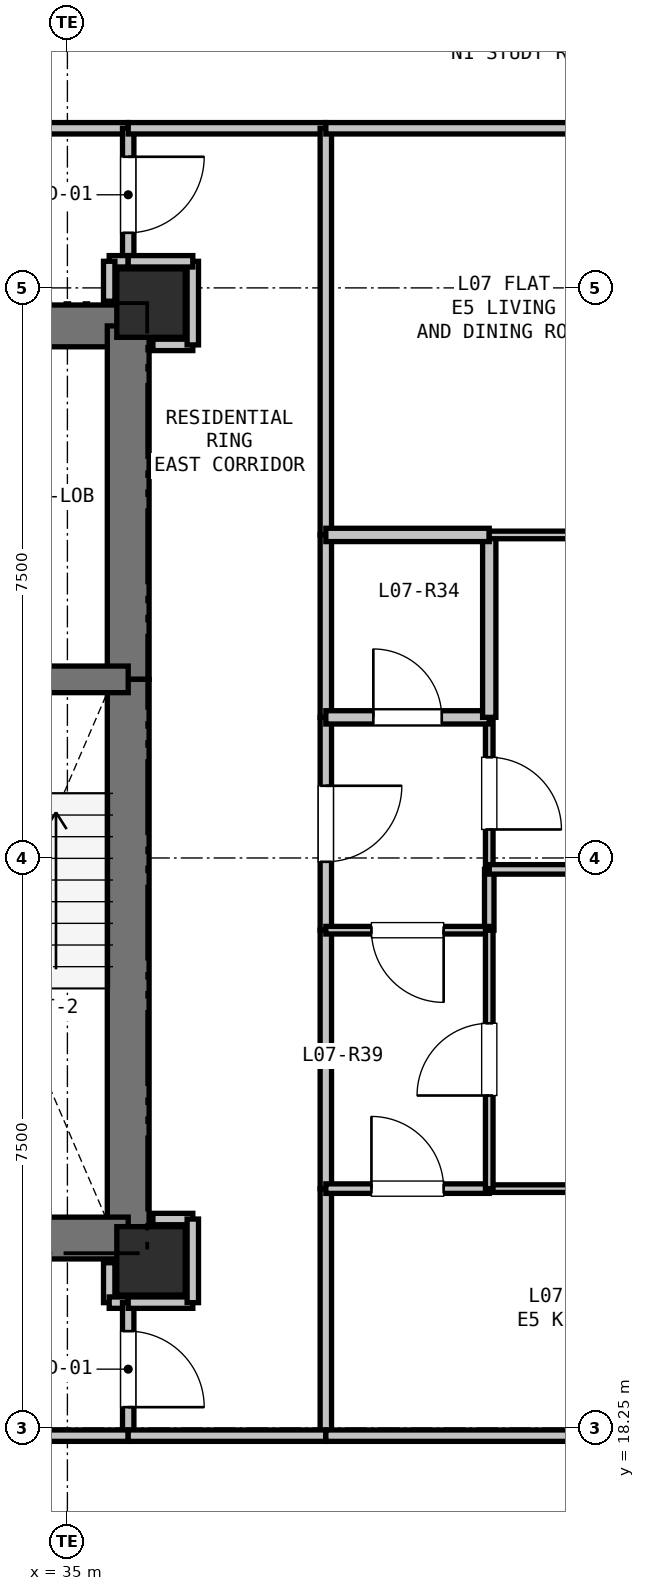
"""IFC4 building model, lengths in metres.
Left out: names, types, materials, properties, quantities, classifications, styles, units other than length and angle.
Written with IfcOpenShell. Run it as: python <this file> out.ifc"""

import sys

from ifc_helpers import new_model, si_unit, direction, frame, frame_2d, origin, origin_2d, place, context, subcontext, project, spatial, rectangle, extrude, element, fill, save


model = new_model("IFC4")
c1 = context("Model", 3, precision=1e-05, world=origin(), true_north=direction((0.0, 1.0)))
c2 = subcontext(c1, "Body", "Model", "MODEL_VIEW")
j1 = project(units=[si_unit("LENGTHUNIT", "METRE"), si_unit("PLANEANGLEUNIT", "RADIAN")], contexts=[c1])
p1 = place(None, origin())
s1 = spatial("IfcSite", under=j1, at=p1, CompositionType="ELEMENT")
p2 = place(p1, origin())
s2 = spatial("IfcBuilding", under=s1, at=p2, CompositionType="ELEMENT")
p3 = place(p2, frame((0.0, 0.0, 29.1)))
s3 = spatial("IfcBuildingStorey", under=s2, at=p3, CompositionType="ELEMENT", Elevation=29.1)
for number, where, z_axis, x_axis in (
    (1, (36.1, 33.05, 0.0), (0.0, 0.0, 1.0), (1.0, 0.0, 0.0)),
    (2, (36.1, 20.45, 0.0), (0.0, 0.0, 1.0), (1.0, 0.0, 0.0)),
):
    element("IfcColumn", number, at=place(p3, frame(where, z_axis=z_axis, x_axis=x_axis)), inside=s3, PredefinedType="COLUMN", context=c2, shape_type="SweptSolid", body=[
        extrude(rectangle(XDim=0.9, YDim=0.9, at=origin_2d()), origin(), (0.0, 0.0, 1.0), 3.3),
    ])
p4 = place(p3, frame((32.35, 32.75, 0.0), z_axis=(0.0, 0.0, 1.0), x_axis=(1.0, 0.0, 0.0)))
e3 = element("IfcWall", 3, at=p4, inside=s3, PredefinedType="SHEAR", context=c2, shape_type="SweptSolid", body=[
    extrude(rectangle(XDim=3.45, YDim=0.55, at=frame_2d((1.725, 0.0))), origin(), (0.0, 0.0, 1.0), 3.04),
])
p5 = place(p4, frame((0.65, 0.0, 0.0)))
e4 = element("IfcOpeningElement", 4, at=p5, cuts=e3, PredefinedType="OPENING", context=c2, shape_type="SweptSolid", body=[
    extrude(rectangle(XDim=1.15, YDim=2.15, at=frame_2d((0.575, 1.075))), frame((0.0, 0.285, 0.0), z_axis=(0.0, -1.0, 0.0), x_axis=(1.0, 0.0, 0.0)), (0.0, 0.0, 1.0), 0.57),
])
p6 = place(p3, frame((35.8, 32.75, 0.0), z_axis=(0.0, 0.0, 1.0), x_axis=(0.0, -1.0, 0.0)))
e5 = element("IfcWall", 5, at=p6, inside=s3, PredefinedType="SHEAR", context=c2, shape_type="SweptSolid", body=[
    extrude(rectangle(XDim=4.65, YDim=0.55, at=frame_2d((2.325, 0.0))), origin(), (0.0, 0.0, 1.0), 3.04),
])
p7 = place(p3, frame((35.8, 28.1, 0.0), z_axis=(0.0, 0.0, 1.0), x_axis=(0.0, -1.0, 0.0)))
e6 = element("IfcWall", 6, at=p7, inside=s3, PredefinedType="SHEAR", context=c2, shape_type="SweptSolid", body=[
    extrude(rectangle(XDim=7.35, YDim=0.55, at=frame_2d((3.675, 0.0))), origin(), (0.0, 0.0, 1.0), 3.04),
])
p8 = place(p3, frame((35.8, 20.75, 0.0), z_axis=(0.0, 0.0, 1.0), x_axis=(-1.0, 0.0, 0.0)))
e7 = element("IfcWall", 7, at=p8, inside=s3, PredefinedType="SHEAR", context=c2, shape_type="SweptSolid", body=[
    extrude(rectangle(XDim=3.45, YDim=0.55, at=frame_2d((1.725, 0.0))), origin(), (0.0, 0.0, 1.0), 3.04),
])
p9 = place(p3, frame((32.35, 28.1, 0.0), z_axis=(0.0, 0.0, 1.0), x_axis=(1.0, 0.0, 0.0)))
e8 = element("IfcWall", 8, at=p9, inside=s3, PredefinedType="SHEAR", context=c2, shape_type="SweptSolid", body=[
    extrude(rectangle(XDim=3.45, YDim=0.35, at=frame_2d((1.725, 0.0))), origin(), (0.0, 0.0, 1.0), 3.04),
])
p10 = place(p9, frame((1.15, 0.0, 0.0)))
e9 = element("IfcOpeningElement", 9, at=p10, cuts=e8, PredefinedType="OPENING", context=c2, shape_type="SweptSolid", body=[
    extrude(rectangle(XDim=1.15, YDim=2.15, at=frame_2d((0.575, 1.075))), frame((0.0, 0.185, 0.0), z_axis=(0.0, -1.0, 0.0), x_axis=(1.0, 0.0, 0.0)), (0.0, 0.0, 1.0), 0.37),
])
p11 = place(p3, frame((35.55, 20.425, 0.0), z_axis=(0.0, 0.0, 1.0), x_axis=(0.0, -1.0, 0.0)))
e10 = element("IfcWall", 10, at=p11, inside=s3, PredefinedType="PARTITIONING", context=c2, shape_type="SweptSolid", body=[
    extrude(rectangle(XDim=0.525, YDim=0.15, at=frame_2d((0.263, 0.0))), origin(), (0.0, 0.0, 1.0), 2.488),
])
p12 = place(p3, frame((35.55, 19.9, 0.0), z_axis=(0.0, 0.0, 1.0), x_axis=(1.0, 0.0, 0.0)))
e11 = element("IfcWall", 11, at=p12, inside=s3, PredefinedType="PARTITIONING", context=c2, shape_type="SweptSolid", body=[
    extrude(rectangle(XDim=0.25, YDim=0.15, at=frame_2d((0.125, 0.0))), origin(), (0.0, 0.0, 1.0), 3.04),
])
p13 = place(p3, frame((35.8, 19.9, 0.0), z_axis=(0.0, 0.0, 1.0), x_axis=(0.0, -1.0, 0.0)))
e12 = element("IfcWall", 12, at=p13, inside=s3, PredefinedType="PARTITIONING", context=c2, shape_type="SweptSolid", body=[
    extrude(rectangle(XDim=1.75, YDim=0.15, at=frame_2d((0.875, 0.0))), origin(), (0.0, 0.0, 1.0), 3.04),
])
p14 = place(p13, frame((0.375, 0.0, 0.0)))
e13 = element("IfcOpeningElement", 13, at=p14, cuts=e12, PredefinedType="OPENING", context=c2, shape_type="SweptSolid", body=[
    extrude(rectangle(XDim=1.0, YDim=2.15, at=frame_2d((0.5, 1.075))), frame((0.0, 0.085, 0.0), z_axis=(0.0, -1.0, 0.0), x_axis=(1.0, 0.0, 0.0)), (0.0, 0.0, 1.0), 0.17),
])
p15 = place(p3, frame((35.8, 18.15, 0.0), z_axis=(0.0, 0.0, 1.0), x_axis=(-1.0, 0.0, 0.0)))
e14 = element("IfcWall", 14, at=p15, inside=s3, PredefinedType="PARTITIONING", context=c2, shape_type="SweptSolid", body=[
    extrude(rectangle(XDim=1.6, YDim=0.15, at=frame_2d((0.8, 0.0))), origin(), (0.0, 0.0, 1.0), 3.04),
])
p16 = place(p3, frame((34.0, 35.35, 0.0), z_axis=(0.0, 0.0, 1.0), x_axis=(1.0, 0.0, 0.0)))
e15 = element("IfcWall", 15, at=p16, inside=s3, PredefinedType="PARTITIONING", context=c2, shape_type="SweptSolid", body=[
    extrude(rectangle(XDim=1.8, YDim=0.15, at=frame_2d((0.9, 0.0))), origin(), (0.0, 0.0, 1.0), 3.04),
])
p17 = place(p3, frame((35.8, 35.35, 0.0), z_axis=(0.0, 0.0, 1.0), x_axis=(0.0, -1.0, 0.0)))
e16 = element("IfcWall", 16, at=p17, inside=s3, PredefinedType="PARTITIONING", context=c2, shape_type="SweptSolid", body=[
    extrude(rectangle(XDim=1.75, YDim=0.15, at=frame_2d((0.875, 0.0))), origin(), (0.0, 0.0, 1.0), 3.04),
])
p18 = place(p17, frame((0.375, 0.0, 0.0)))
e17 = element("IfcOpeningElement", 17, at=p18, cuts=e16, PredefinedType="OPENING", context=c2, shape_type="SweptSolid", body=[
    extrude(rectangle(XDim=1.0, YDim=2.15, at=frame_2d((0.5, 1.075))), frame((0.0, 0.085, 0.0), z_axis=(0.0, -1.0, 0.0), x_axis=(1.0, 0.0, 0.0)), (0.0, 0.0, 1.0), 0.17),
])
p19 = place(p3, frame((35.8, 33.6, 0.0), z_axis=(0.0, 0.0, 1.0), x_axis=(-1.0, 0.0, 0.0)))
e18 = element("IfcWall", 18, at=p19, inside=s3, PredefinedType="PARTITIONING", context=c2, shape_type="SweptSolid", body=[
    extrude(rectangle(XDim=0.25, YDim=0.15, at=frame_2d((0.125, 0.0))), origin(), (0.0, 0.0, 1.0), 3.04),
])
p20 = place(p3, frame((35.55, 33.6, 0.0), z_axis=(0.0, 0.0, 1.0), x_axis=(0.0, -1.0, 0.0)))
e19 = element("IfcWall", 19, at=p20, inside=s3, PredefinedType="PARTITIONING", context=c2, shape_type="SweptSolid", body=[
    extrude(rectangle(XDim=0.525, YDim=0.15, at=frame_2d((0.263, 0.0))), origin(), (0.0, 0.0, 1.0), 2.488),
])
for number, where, z_axis, x_axis in (
    (20, (36.65, 21.0, 0.0), (0.0, 0.0, 1.0), (-1.0, 0.0, 0.0)),
    (21, (36.125, 32.5, 0.0), (0.0, 0.0, 1.0), (1.0, 0.0, 0.0)),
):
    element("IfcWall", number, at=place(p3, frame(where, z_axis=z_axis, x_axis=x_axis)), inside=s3, PredefinedType="PARTITIONING", context=c2, shape_type="SweptSolid", body=[
        extrude(rectangle(XDim=0.525, YDim=0.15, at=frame_2d((0.262, 0.0))), origin(), (0.0, 0.0, 1.0), 2.488),
    ])
p21 = place(p3, frame((36.65, 32.5, 0.0), z_axis=(0.0, 0.0, 1.0), x_axis=(0.0, 1.0, 0.0)))
e22 = element("IfcWall", 22, at=p21, inside=s3, PredefinedType="PARTITIONING", context=c2, shape_type="SweptSolid", body=[
    extrude(rectangle(XDim=1.1, YDim=0.15, at=frame_2d((0.55, 0.0))), origin(), (0.0, 0.0, 1.0), 2.337),
])
p22 = place(p3, frame((36.65, 33.6, 0.0), z_axis=(0.0, 0.0, 1.0), x_axis=(-1.0, 0.0, 0.0)))
e23 = element("IfcWall", 23, at=p22, inside=s3, PredefinedType="PARTITIONING", context=c2, shape_type="SweptSolid", body=[
    extrude(rectangle(XDim=0.85, YDim=0.15, at=frame_2d((0.425, 0.0))), origin(), (0.0, 0.0, 1.0), 2.337),
])
p23 = place(p3, frame((35.8, 35.35, 0.0), z_axis=(0.0, 0.0, 1.0), x_axis=(1.0, 0.0, 0.0)))
e24 = element("IfcWall", 24, at=p23, inside=s3, PredefinedType="PARTITIONING", context=c2, shape_type="SweptSolid", body=[
    extrude(rectangle(XDim=2.6, YDim=0.15, at=frame_2d((1.3, 0.0))), origin(), (0.0, 0.0, 1.0), 2.337),
])
p24 = place(p3, frame((38.4, 35.35, 0.0), z_axis=(0.0, 0.0, 1.0), x_axis=(0.0, -1.0, 0.0)))
e25 = element("IfcWall", 25, at=p24, inside=s3, PredefinedType="PARTITIONING", context=c2, shape_type="SweptSolid", body=[
    extrude(rectangle(XDim=5.35, YDim=0.15, at=frame_2d((2.675, 0.0))), origin(), (0.0, 0.0, 1.0), 2.337),
])
p25 = place(p3, frame((38.4, 30.0, 0.0), z_axis=(0.0, 0.0, 1.0), x_axis=(0.0, -1.0, 0.0)))
e26 = element("IfcWall", 26, at=p25, inside=s3, PredefinedType="PARTITIONING", context=c2, shape_type="SweptSolid", body=[
    extrude(rectangle(XDim=2.4, YDim=0.15, at=frame_2d((1.2, 0.0))), origin(), (0.0, 0.0, 1.0), 3.04),
])
p26 = place(p3, frame((38.4, 27.6, 0.0), z_axis=(0.0, 0.0, 1.0), x_axis=(0.0, -1.0, 0.0)))
e27 = element("IfcWall", 27, at=p26, inside=s3, PredefinedType="PARTITIONING", context=c2, shape_type="SweptSolid", body=[
    extrude(rectangle(XDim=2.8, YDim=0.15, at=frame_2d((1.4, 0.0))), origin(), (0.0, 0.0, 1.0), 3.04),
])
p27 = place(p26, frame((0.9, 0.0, 0.0)))
e28 = element("IfcOpeningElement", 28, at=p27, cuts=e27, PredefinedType="OPENING", context=c2, shape_type="SweptSolid", body=[
    extrude(rectangle(XDim=1.0, YDim=2.15, at=frame_2d((0.5, 1.075))), frame((0.0, 0.085, 0.0), z_axis=(0.0, -1.0, 0.0), x_axis=(1.0, 0.0, 0.0)), (0.0, 0.0, 1.0), 0.17),
])
p28 = place(p3, frame((38.4, 24.8, 0.0), z_axis=(0.0, 0.0, 1.0), x_axis=(0.0, -1.0, 0.0)))
e29 = element("IfcWall", 29, at=p28, inside=s3, PredefinedType="PARTITIONING", context=c2, shape_type="SweptSolid", body=[
    extrude(rectangle(XDim=3.4, YDim=0.15, at=frame_2d((1.7, 0.0))), origin(), (0.0, 0.0, 1.0), 3.04),
])
p29 = place(p3, frame((38.4, 21.4, 0.0), z_axis=(0.0, 0.0, 1.0), x_axis=(0.0, -1.0, 0.0)))
e30 = element("IfcWall", 30, at=p29, inside=s3, PredefinedType="PARTITIONING", context=c2, shape_type="SweptSolid", body=[
    extrude(rectangle(XDim=3.25, YDim=0.15, at=frame_2d((1.625, 0.0))), origin(), (0.0, 0.0, 1.0), 3.04),
])
p30 = place(p3, frame((38.4, 18.15, 0.0), z_axis=(0.0, 0.0, 1.0), x_axis=(-1.0, 0.0, 0.0)))
e31 = element("IfcWall", 31, at=p30, inside=s3, PredefinedType="PARTITIONING", context=c2, shape_type="SweptSolid", body=[
    extrude(rectangle(XDim=2.6, YDim=0.15, at=frame_2d((1.3, 0.0))), origin(), (0.0, 0.0, 1.0), 2.337),
])
p31 = place(p3, frame((35.8, 19.9, 0.0), z_axis=(0.0, 0.0, 1.0), x_axis=(1.0, 0.0, 0.0)))
e32 = element("IfcWall", 32, at=p31, inside=s3, PredefinedType="PARTITIONING", context=c2, shape_type="SweptSolid", body=[
    extrude(rectangle(XDim=0.85, YDim=0.15, at=frame_2d((0.425, 0.0))), origin(), (0.0, 0.0, 1.0), 2.337),
])
p32 = place(p3, frame((36.65, 19.9, 0.0), z_axis=(0.0, 0.0, 1.0), x_axis=(0.0, 1.0, 0.0)))
e33 = element("IfcWall", 33, at=p32, inside=s3, PredefinedType="PARTITIONING", context=c2, shape_type="SweptSolid", body=[
    extrude(rectangle(XDim=1.1, YDim=0.15, at=frame_2d((0.55, 0.0))), origin(), (0.0, 0.0, 1.0), 3.04),
])
p33 = place(p3, frame((40.55, 27.6, 0.0), z_axis=(0.0, 0.0, 1.0), x_axis=(0.0, -1.0, 0.0)))
e34 = element("IfcWall", 34, at=p33, inside=s3, PredefinedType="PARTITIONING", context=c2, shape_type="SweptSolid", body=[
    extrude(rectangle(XDim=2.0, YDim=0.1, at=frame_2d((1.0, 0.0))), origin(), (0.0, 0.0, 1.0), 3.04),
])
p34 = place(p33, frame((0.525, 0.0, 0.0)))
e35 = element("IfcOpeningElement", 35, at=p34, cuts=e34, PredefinedType="OPENING", context=c2, shape_type="SweptSolid", body=[
    extrude(rectangle(XDim=0.95, YDim=2.1, at=frame_2d((0.475, 1.05))), frame((0.0, 0.06, 0.0), z_axis=(0.0, -1.0, 0.0), x_axis=(1.0, 0.0, 0.0)), (0.0, 0.0, 1.0), 0.12),
])
p35 = place(p3, frame((40.55, 25.6, 0.0), z_axis=(0.0, 0.0, 1.0), x_axis=(0.0, -1.0, 0.0)))
e36 = element("IfcWall", 36, at=p35, inside=s3, PredefinedType="PARTITIONING", context=c2, shape_type="SweptSolid", body=[
    extrude(rectangle(XDim=0.8, YDim=0.125, at=frame_2d((0.4, 0.0))), origin(), (0.0, 0.0, 1.0), 3.04),
])
p36 = place(p3, frame((40.55, 24.8, 0.0), z_axis=(0.0, 0.0, 1.0), x_axis=(-1.0, 0.0, 0.0)))
e37 = element("IfcWall", 37, at=p36, inside=s3, PredefinedType="PARTITIONING", context=c2, shape_type="SweptSolid", body=[
    extrude(rectangle(XDim=2.15, YDim=0.1, at=frame_2d((1.075, 0.0))), origin(), (0.0, 0.0, 1.0), 3.04),
])
p37 = place(p36, frame((0.6, 0.0, 0.0)))
e38 = element("IfcOpeningElement", 38, at=p37, cuts=e37, PredefinedType="OPENING", context=c2, shape_type="SweptSolid", body=[
    extrude(rectangle(XDim=0.95, YDim=2.1, at=frame_2d((0.475, 1.05))), frame((0.0, 0.06, 0.0), z_axis=(0.0, -1.0, 0.0), x_axis=(1.0, 0.0, 0.0)), (0.0, 0.0, 1.0), 0.12),
])
p38 = place(p3, frame((38.4, 27.6, 0.0), z_axis=(0.0, 0.0, 1.0), x_axis=(1.0, 0.0, 0.0)))
e39 = element("IfcWall", 39, at=p38, inside=s3, PredefinedType="PLUMBINGWALL", context=c2, shape_type="SweptSolid", body=[
    extrude(rectangle(XDim=2.15, YDim=0.175, at=frame_2d((1.075, 0.0))), origin(), (0.0, 0.0, 1.0), 3.04),
])
p39 = place(p38, frame((0.625, 0.0, 0.0)))
e40 = element("IfcOpeningElement", 40, at=p39, cuts=e39, PredefinedType="OPENING", context=c2, shape_type="SweptSolid", body=[
    extrude(rectangle(XDim=0.9, YDim=2.1, at=frame_2d((0.45, 1.05))), frame((0.0, 0.097, 0.0), z_axis=(0.0, -1.0, 0.0), x_axis=(1.0, 0.0, 0.0)), (0.0, 0.0, 1.0), 0.195),
])
p40 = place(p3, frame((38.4, 18.15, 0.0), z_axis=(0.0, 0.0, 1.0), x_axis=(1.0, 0.0, 0.0)))
e41 = element("IfcWall", 41, at=p40, inside=s3, PredefinedType="PARTITIONING", context=c2, shape_type="SweptSolid", body=[
    extrude(rectangle(XDim=5.289, YDim=0.15, at=frame_2d((2.644, 0.0))), origin(), (0.0, 0.0, 1.0), 2.365),
])
p41 = place(p3, frame((40.55, 30.0, 0.0), z_axis=(0.0, 0.0, 1.0), x_axis=(0.0, -1.0, 0.0)))
e42 = element("IfcWall", 42, at=p41, inside=s3, PredefinedType="PLUMBINGWALL", context=c2, shape_type="SweptSolid", body=[
    extrude(rectangle(XDim=2.4, YDim=0.175, at=frame_2d((1.2, 0.0))), origin(), (0.0, 0.0, 1.0), 3.04),
])
p42 = place(p3, frame((38.4, 30.0, 0.0), z_axis=(0.0, 0.0, 1.0), x_axis=(1.0, 0.0, 0.0)))
e43 = element("IfcWall", 43, at=p42, inside=s3, PredefinedType="PLUMBINGWALL", context=c2, shape_type="SweptSolid", body=[
    extrude(rectangle(XDim=2.15, YDim=0.175, at=frame_2d((1.075, 0.0))), origin(), (0.0, 0.0, 1.0), 3.04),
])
p43 = place(p3, frame((38.4, 21.4, 0.0), z_axis=(0.0, 0.0, 1.0), x_axis=(1.0, 0.0, 0.0)))
e44 = element("IfcWall", 44, at=p43, inside=s3, PredefinedType="PARTITIONING", context=c2, shape_type="SweptSolid", body=[
    extrude(rectangle(XDim=2.15, YDim=0.125, at=frame_2d((1.075, 0.0))), origin(), (0.0, 0.0, 1.0), 3.04),
])
p44 = place(p43, frame((0.6, 0.0, 0.0)))
e45 = element("IfcOpeningElement", 45, at=p44, cuts=e44, PredefinedType="OPENING", context=c2, shape_type="SweptSolid", body=[
    extrude(rectangle(XDim=0.95, YDim=2.1, at=frame_2d((0.475, 1.05))), frame((0.0, 0.073, 0.0), z_axis=(0.0, -1.0, 0.0), x_axis=(1.0, 0.0, 0.0)), (0.0, 0.0, 1.0), 0.145),
])
p45 = place(p3, frame((40.55, 21.4, 0.0), z_axis=(0.0, 0.0, 1.0), x_axis=(1.0, 0.0, 0.0)))
e46 = element("IfcWall", 46, at=p45, inside=s3, PredefinedType="PARTITIONING", context=c2, shape_type="SweptSolid", body=[
    extrude(rectangle(XDim=3.264, YDim=0.1, at=frame_2d((1.632, 0.0))), origin(), (0.0, 0.0, 1.0), 2.365),
])
p46 = place(p3, frame((43.688, 35.35, 0.0), z_axis=(0.0, 0.0, 1.0), x_axis=(-1.0, 0.0, 0.0)))
e47 = element("IfcWall", 47, at=p46, inside=s3, PredefinedType="PARTITIONING", context=c2, shape_type="SweptSolid", body=[
    extrude(rectangle(XDim=5.289, YDim=0.15, at=frame_2d((2.644, 0.0))), origin(), (0.0, 0.0, 1.0), 2.337),
])
p47 = place(p3, frame((43.814, 30.0, 0.0), z_axis=(0.0, 0.0, 1.0), x_axis=(-1.0, 0.0, 0.0)))
e48 = element("IfcWall", 48, at=p47, inside=s3, PredefinedType="PARTITIONING", context=c2, shape_type="SweptSolid", body=[
    extrude(rectangle(XDim=3.264, YDim=0.1, at=frame_2d((1.632, 0.0))), origin(), (0.0, 0.0, 1.0), 2.365),
])
p48 = place(p47, frame((1.157, 0.0, 0.0)))
e49 = element("IfcOpeningElement", 49, at=p48, cuts=e48, PredefinedType="OPENING", context=c2, shape_type="SweptSolid", body=[
    extrude(rectangle(XDim=0.95, YDim=2.1, at=frame_2d((0.475, 1.05))), frame((0.0, 0.06, 0.0), z_axis=(0.0, -1.0, 0.0), x_axis=(1.0, 0.0, 0.0)), (0.0, 0.0, 1.0), 0.12),
])
p49 = place(p3, frame((43.814, 25.6, 0.0), z_axis=(0.0, 0.0, 1.0), x_axis=(-1.0, 0.0, 0.0)))
e50 = element("IfcWall", 50, at=p49, inside=s3, PredefinedType="PARTITIONING", context=c2, shape_type="SweptSolid", body=[
    extrude(rectangle(XDim=3.264, YDim=0.125, at=frame_2d((1.632, 0.0))), origin(), (0.0, 0.0, 1.0), 2.365),
])
p50 = place(p3, frame((40.55, 21.4, 0.0), z_axis=(0.0, 0.0, 1.0), x_axis=(0.0, 1.0, 0.0)))
e51 = element("IfcWall", 51, at=p50, inside=s3, PredefinedType="PARTITIONING", context=c2, shape_type="SweptSolid", body=[
    extrude(rectangle(XDim=3.4, YDim=0.1, at=frame_2d((1.7, 0.0))), origin(), (0.0, 0.0, 1.0), 3.04),
])
p51 = place(p50, frame((1.225, 0.0, 0.0)))
e52 = element("IfcOpeningElement", 52, at=p51, cuts=e51, PredefinedType="OPENING", context=c2, shape_type="SweptSolid", body=[
    extrude(rectangle(XDim=0.95, YDim=2.1, at=frame_2d((0.475, 1.05))), frame((0.0, 0.06, 0.0), z_axis=(0.0, -1.0, 0.0), x_axis=(1.0, 0.0, 0.0)), (0.0, 0.0, 1.0), 0.12),
])
p52 = place(p14, origin())
e53 = element("IfcDoor", 53, at=p52, inside=s3, OperationType="SINGLE_SWING_RIGHT", PredefinedType="DOOR", context=c2, shape_type="SweptSolid", body=[
    extrude(rectangle(XDim=1.0, YDim=2.15, at=frame_2d((0.5, 1.075))), frame((0.0, 0.025, 0.0), z_axis=(0.0, -1.0, 0.0), x_axis=(1.0, 0.0, 0.0)), (0.0, 0.0, 1.0), 0.05),
])
fill(e13, e53)
p53 = place(p18, origin())
e54 = element("IfcDoor", 54, at=p53, inside=s3, OperationType="SINGLE_SWING_LEFT", PredefinedType="DOOR", context=c2, shape_type="SweptSolid", body=[
    extrude(rectangle(XDim=1.0, YDim=2.15, at=frame_2d((0.5, 1.075))), frame((0.0, 0.025, 0.0), z_axis=(0.0, -1.0, 0.0), x_axis=(1.0, 0.0, 0.0)), (0.0, 0.0, 1.0), 0.05),
])
fill(e17, e54)
p54 = place(p27, origin())
e55 = element("IfcDoor", 55, at=p54, inside=s3, OperationType="SINGLE_SWING_LEFT", PredefinedType="DOOR", context=c2, shape_type="SweptSolid", body=[
    extrude(rectangle(XDim=1.0, YDim=2.15, at=frame_2d((0.5, 1.075))), frame((0.0, 0.025, 0.0), z_axis=(0.0, -1.0, 0.0), x_axis=(1.0, 0.0, 0.0)), (0.0, 0.0, 1.0), 0.05),
])
fill(e28, e55)
p55 = place(p39, origin())
e56 = element("IfcDoor", 56, at=p55, inside=s3, OperationType="SINGLE_SWING_LEFT", PredefinedType="DOOR", context=c2, shape_type="SweptSolid", body=[
    extrude(rectangle(XDim=0.9, YDim=2.1, at=frame_2d((0.45, 1.05))), frame((0.0, 0.025, 0.0), z_axis=(0.0, -1.0, 0.0), x_axis=(1.0, 0.0, 0.0)), (0.0, 0.0, 1.0), 0.05),
])
fill(e40, e56)
p56 = place(p34, origin())
e57 = element("IfcDoor", 57, at=p56, inside=s3, OperationType="SINGLE_SWING_RIGHT", PredefinedType="DOOR", context=c2, shape_type="SweptSolid", body=[
    extrude(rectangle(XDim=0.95, YDim=2.1, at=frame_2d((0.475, 1.05))), frame((0.0, 0.025, 0.0), z_axis=(0.0, -1.0, 0.0), x_axis=(1.0, 0.0, 0.0)), (0.0, 0.0, 1.0), 0.05),
])
fill(e35, e57)
p57 = place(p37, origin())
e58 = element("IfcDoor", 58, at=p57, inside=s3, OperationType="SINGLE_SWING_LEFT", PredefinedType="DOOR", context=c2, shape_type="SweptSolid", body=[
    extrude(rectangle(XDim=0.95, YDim=2.1, at=frame_2d((0.475, 1.05))), frame((0.0, 0.025, 0.0), z_axis=(0.0, -1.0, 0.0), x_axis=(1.0, 0.0, 0.0)), (0.0, 0.0, 1.0), 0.05),
])
fill(e38, e58)
p58 = place(p44, origin())
e59 = element("IfcDoor", 59, at=p58, inside=s3, OperationType="SINGLE_SWING_LEFT", PredefinedType="DOOR", context=c2, shape_type="SweptSolid", body=[
    extrude(rectangle(XDim=0.95, YDim=2.1, at=frame_2d((0.475, 1.05))), frame((0.0, 0.025, 0.0), z_axis=(0.0, -1.0, 0.0), x_axis=(1.0, 0.0, 0.0)), (0.0, 0.0, 1.0), 0.05),
])
fill(e45, e59)
p59 = place(p51, origin())
e60 = element("IfcDoor", 60, at=p59, inside=s3, OperationType="SINGLE_SWING_LEFT", PredefinedType="DOOR", context=c2, shape_type="SweptSolid", body=[
    extrude(rectangle(XDim=0.95, YDim=2.1, at=frame_2d((0.475, 1.05))), frame((0.0, 0.025, 0.0), z_axis=(0.0, -1.0, 0.0), x_axis=(1.0, 0.0, 0.0)), (0.0, 0.0, 1.0), 0.05),
])
fill(e52, e60)
save(model, sys.argv[1])
